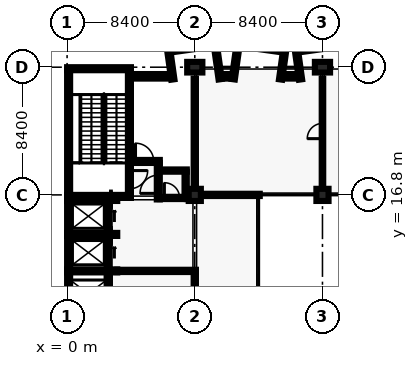
"""IFC4 building model, lengths in metres.
Left out: names, types, materials, properties, quantities, classifications, styles, units other than length and angle.
Written with IfcOpenShell. Run it as: python <this file> out.ifc"""

import sys

from ifc_helpers import new_model, si_unit, direction, frame, frame_2d, origin, origin_2d, place, context, subcontext, project, spatial, rectangle, extrude, element, fill, save


model = new_model("IFC4")
c1 = context("Model", 3, precision=1e-05, world=origin(), true_north=direction((0.0, 1.0)))
c2 = subcontext(c1, "Body", "Model", "MODEL_VIEW")
j1 = project(units=[si_unit("LENGTHUNIT", "METRE"), si_unit("PLANEANGLEUNIT", "RADIAN")], contexts=[c1])
p1 = place(None, origin())
s1 = spatial("IfcSite", under=j1, at=p1, CompositionType="ELEMENT")
p2 = place(p1, origin())
s2 = spatial("IfcBuilding", under=s1, at=p2, CompositionType="ELEMENT")
p3 = place(p2, frame((0.0, 0.0, 10.2)))
s3 = spatial("IfcBuildingStorey", under=s2, at=p3, CompositionType="ELEMENT", Elevation=10.2)
for number, where, z_axis, x_axis in (
    (1, (4.2, 16.7, 0.0), (0.0, 0.0, 1.0), (-1.0, 0.0, 0.0)),
    (2, (0.0, 25.1, 0.0), (0.0, 0.0, 1.0), (1.0, 0.0, 0.0)),
):
    element("IfcWall", number, at=place(p3, frame(where, z_axis=z_axis, x_axis=x_axis)), inside=s3, PredefinedType="SHEAR", context=c2, shape_type="SweptSolid", body=[
        extrude(rectangle(XDim=4.199, YDim=0.2, at=frame_2d((2.1, 0.0))), origin(), (0.0, 0.0, 1.0), 4.8),
    ])
p4 = place(p3, frame((0.1, 16.8, 0.0), z_axis=(0.0, 0.0, 1.0), x_axis=(0.0, 1.0, 0.0)))
e3 = element("IfcWall", 3, at=p4, inside=s3, PredefinedType="SHEAR", context=c2, shape_type="SweptSolid", body=[
    extrude(rectangle(XDim=8.2, YDim=0.2, at=frame_2d((4.1, 0.0))), origin(), (0.0, 0.0, 1.0), 4.8),
])
p5 = place(p3, frame((4.1, 25.0, 0.0), z_axis=(0.0, 0.0, 1.0), x_axis=(0.0, -1.0, 0.0)))
e4 = element("IfcWall", 4, at=p5, inside=s3, PredefinedType="SHEAR", context=c2, shape_type="SweptSolid", body=[
    extrude(rectangle(XDim=8.2, YDim=0.2, at=frame_2d((4.1, 0.0))), origin(), (0.0, 0.0, 1.0), 4.8),
])
p6 = place(p5, frame((6.6, 0.0, 0.0)))
e5 = element("IfcOpeningElement", 5, at=p6, cuts=e4, PredefinedType="OPENING", context=c2, shape_type="SweptSolid", body=[
    extrude(rectangle(XDim=1.2, YDim=2.1, at=frame_2d((0.6, 1.05))), frame((0.0, 0.11, 0.0), z_axis=(0.0, -1.0, 0.0), x_axis=(1.0, 0.0, 0.0)), (0.0, 0.0, 1.0), 0.22),
])
p7 = place(p3, frame((0.0, 11.8, 0.0), z_axis=(0.0, 0.0, 1.0), x_axis=(1.0, 0.0, 0.0)))
e6 = element("IfcWall", 6, at=p7, inside=s3, PredefinedType="SHEAR", context=c2, shape_type="SweptSolid", body=[
    extrude(rectangle(XDim=2.8, YDim=0.2, at=frame_2d((1.4, 0.0))), origin(), (0.0, 0.0, 1.0), 4.8),
])
p8 = place(p3, frame((0.1, 9.0, 0.0), z_axis=(0.0, 0.0, 1.0), x_axis=(0.0, 1.0, 0.0)))
e7 = element("IfcWall", 7, at=p8, inside=s3, PredefinedType="SHEAR", context=c2, shape_type="SweptSolid", body=[
    extrude(rectangle(XDim=2.7, YDim=0.2, at=frame_2d((1.35, 0.0))), origin(), (0.0, 0.0, 1.0), 4.8),
])
p9 = place(p3, frame((2.7, 11.7, 0.0), z_axis=(0.0, 0.0, 1.0), x_axis=(0.0, -1.0, 0.0)))
e8 = element("IfcWall", 8, at=p9, inside=s3, PredefinedType="SHEAR", context=c2, shape_type="SweptSolid", body=[
    extrude(rectangle(XDim=2.7, YDim=0.2, at=frame_2d((1.35, 0.0))), origin(), (0.0, 0.0, 1.0), 4.8),
])
p10 = place(p9, frame((0.85, 0.0, 0.0)))
e9 = element("IfcOpeningElement", 9, at=p10, cuts=e8, PredefinedType="OPENING", context=c2, shape_type="SweptSolid", body=[
    extrude(rectangle(XDim=1.1, YDim=2.1, at=frame_2d((0.55, 1.05))), frame((0.0, 0.11, 0.0), z_axis=(0.0, -1.0, 0.0), x_axis=(1.0, 0.0, 0.0)), (0.0, 0.0, 1.0), 0.22),
])
p11 = place(p3, frame((0.0, 14.2, 0.0), z_axis=(0.0, 0.0, 1.0), x_axis=(1.0, 0.0, 0.0)))
e10 = element("IfcWall", 10, at=p11, inside=s3, PredefinedType="SHEAR", context=c2, shape_type="SweptSolid", body=[
    extrude(rectangle(XDim=2.8, YDim=0.2, at=frame_2d((1.4, 0.0))), origin(), (0.0, 0.0, 1.0), 4.8),
])
p12 = place(p3, frame((0.1, 11.9, 0.0), z_axis=(0.0, 0.0, 1.0), x_axis=(0.0, 1.0, 0.0)))
e11 = element("IfcWall", 11, at=p12, inside=s3, PredefinedType="SHEAR", context=c2, shape_type="SweptSolid", body=[
    extrude(rectangle(XDim=2.2, YDim=0.2, at=frame_2d((1.1, 0.0))), origin(), (0.0, 0.0, 1.0), 4.8),
])
p13 = place(p3, frame((2.7, 14.1, 0.0), z_axis=(0.0, 0.0, 1.0), x_axis=(0.0, -1.0, 0.0)))
e12 = element("IfcWall", 12, at=p13, inside=s3, PredefinedType="SHEAR", context=c2, shape_type="SweptSolid", body=[
    extrude(rectangle(XDim=2.2, YDim=0.2, at=frame_2d((1.1, 0.0))), origin(), (0.0, 0.0, 1.0), 4.8),
])
p14 = place(p13, frame((0.55, 0.0, 0.0)))
e13 = element("IfcOpeningElement", 13, at=p14, cuts=e12, PredefinedType="OPENING", context=c2, shape_type="SweptSolid", body=[
    extrude(rectangle(XDim=1.1, YDim=2.1, at=frame_2d((0.55, 1.05))), frame((0.0, 0.11, 0.0), z_axis=(0.0, -1.0, 0.0), x_axis=(1.0, 0.0, 0.0)), (0.0, 0.0, 1.0), 0.22),
])
p15 = place(p3, frame((0.0, 16.5, 0.0), z_axis=(0.0, 0.0, 1.0), x_axis=(1.0, 0.0, 0.0)))
e14 = element("IfcWall", 14, at=p15, inside=s3, PredefinedType="SHEAR", context=c2, shape_type="SweptSolid", body=[
    extrude(rectangle(XDim=2.8, YDim=0.2, at=frame_2d((1.4, 0.0))), origin(), (0.0, 0.0, 1.0), 4.8),
])
p16 = place(p3, frame((0.1, 14.3, 0.0), z_axis=(0.0, 0.0, 1.0), x_axis=(0.0, 1.0, 0.0)))
e15 = element("IfcWall", 15, at=p16, inside=s3, PredefinedType="SHEAR", context=c2, shape_type="SweptSolid", body=[
    extrude(rectangle(XDim=2.1, YDim=0.2, at=frame_2d((1.05, 0.0))), origin(), (0.0, 0.0, 1.0), 4.8),
])
p17 = place(p3, frame((2.7, 16.4, 0.0), z_axis=(0.0, 0.0, 1.0), x_axis=(0.0, -1.0, 0.0)))
e16 = element("IfcWall", 16, at=p17, inside=s3, PredefinedType="SHEAR", context=c2, shape_type="SweptSolid", body=[
    extrude(rectangle(XDim=2.1, YDim=0.2, at=frame_2d((1.05, 0.0))), origin(), (0.0, 0.0, 1.0), 4.8),
])
p18 = place(p17, frame((0.45, 0.0, 0.0)))
e17 = element("IfcOpeningElement", 17, at=p18, cuts=e16, PredefinedType="OPENING", context=c2, shape_type="SweptSolid", body=[
    extrude(rectangle(XDim=1.1, YDim=2.1, at=frame_2d((0.55, 1.05))), frame((0.0, 0.11, 0.0), z_axis=(0.0, -1.0, 0.0), x_axis=(1.0, 0.0, 0.0)), (0.0, 0.0, 1.0), 0.22),
])
p19 = place(p3, frame((8.4, 16.8, 0.0), z_axis=(0.0, 0.0, 1.0), x_axis=(1.0, 0.0, 0.0)))
e18 = element("IfcColumn", 18, at=p19, inside=s3, PredefinedType="COLUMN", context=c2, shape_type="SweptSolid", body=[
    extrude(rectangle(XDim=0.8, YDim=0.8, at=origin_2d()), origin(), (0.0, 0.0, 1.0), 4.8),
])
p20 = place(p3, frame((8.4, 25.2, 0.0), z_axis=(0.0, 0.0, 1.0), x_axis=(1.0, 0.0, 0.0)))
e19 = element("IfcColumn", 19, at=p20, inside=s3, PredefinedType="COLUMN", context=c2, shape_type="SweptSolid", body=[
    extrude(rectangle(XDim=1.0, YDim=0.7, at=origin_2d()), origin(), (0.0, 0.0, 1.0), 4.8),
])
p21 = place(p3, frame((16.8, 16.8, 0.0), z_axis=(0.0, 0.0, 1.0), x_axis=(1.0, 0.0, 0.0)))
e20 = element("IfcColumn", 20, at=p21, inside=s3, PredefinedType="COLUMN", context=c2, shape_type="SweptSolid", body=[
    extrude(rectangle(XDim=0.8, YDim=0.8, at=origin_2d()), origin(), (0.0, 0.0, 1.0), 4.8),
])
p22 = place(p3, frame((16.8, 25.2, 0.0), z_axis=(0.0, 0.0, 1.0), x_axis=(1.0, 0.0, 0.0)))
e21 = element("IfcColumn", 21, at=p22, inside=s3, PredefinedType="COLUMN", context=c2, shape_type="SweptSolid", body=[
    extrude(rectangle(XDim=1.0, YDim=0.7, at=origin_2d()), origin(), (0.0, 0.0, 1.0), 4.8),
])
for number, where, z_axis, x_axis in (
    (22, (2.8, 11.8, 0.0), (0.0, 0.0, 1.0), (1.0, 0.0, 0.0)),
    (23, (2.8, 14.2, 0.0), (0.0, 0.0, 1.0), (1.0, 0.0, 0.0)),
    (24, (2.8, 16.5, 0.0), (0.0, 0.0, 1.0), (1.0, 0.0, 0.0)),
):
    element("IfcWall", number, at=place(p3, frame(where, z_axis=z_axis, x_axis=x_axis)), inside=s3, PredefinedType="SHEAR", context=c2, shape_type="SweptSolid", body=[
        extrude(rectangle(XDim=0.5, YDim=0.2, at=frame_2d((0.25, 0.0))), origin(), (0.0, 0.0, 1.0), 4.8),
    ])
p23 = place(p3, frame((6.956, 24.391, 0.0), z_axis=(0.0, 0.0, 1.0), x_axis=(-0.139161311926, 0.990269725511, 0.0)))
e25 = element("IfcWall", 25, at=p23, inside=s3, PredefinedType="SOLIDWALL", context=c2, shape_type="SweptSolid", body=[
    extrude(rectangle(XDim=1.8, YDim=0.215, at=frame_2d((0.9, 0.0))), origin(), (0.0, 0.0, 1.0), 4.5),
])
for number, where, z_axis, x_axis in (
    (26, (10.069, 24.405, 0.0), (0.0, 0.0, 1.0), (-0.139, 0.99, 0.0)),
    (27, (10.931, 24.405, 0.0), (0.0, 0.0, 1.0), (0.139, 0.99, 0.0)),
):
    element("IfcWall", number, at=place(p3, frame(where, z_axis=z_axis, x_axis=x_axis)), inside=s3, PredefinedType="SOLIDWALL", context=c2, shape_type="SweptSolid", body=[
        extrude(rectangle(XDim=2.219, YDim=0.215, at=frame_2d((1.11, 0.0))), origin(), (0.0, 0.0, 1.0), 4.5),
    ])
for number, where, z_axis, x_axis in (
    (28, (14.044, 24.391, 0.0), (0.0, 0.0, 1.0), (0.139, 0.99, 0.0)),
    (29, (15.356, 24.391, 0.0), (0.0, 0.0, 1.0), (-0.139, 0.99, 0.0)),
):
    element("IfcWall", number, at=place(p3, frame(where, z_axis=z_axis, x_axis=x_axis)), inside=s3, PredefinedType="SOLIDWALL", context=c2, shape_type="SweptSolid", body=[
        extrude(rectangle(XDim=1.8, YDim=0.215, at=frame_2d((0.9, 0.0))), origin(), (0.0, 0.0, 1.0), 4.5),
    ])
p24 = place(p3, frame((4.2, 24.6, 0.0), z_axis=(0.0, 0.0, 1.0), x_axis=(1.0, 0.0, 0.0)))
e30 = element("IfcWall", 30, at=p24, inside=s3, PredefinedType="SOLIDWALL", context=c2, shape_type="SweptSolid", body=[
    extrude(rectangle(XDim=2.618, YDim=0.3, at=frame_2d((1.309, 0.0))), origin(), (0.0, 0.0, 1.0), 4.5),
])
p25 = place(p24, frame((0.859, 0.0, 0.9)))
e31 = element("IfcOpeningElement", 31, at=p25, cuts=e30, PredefinedType="OPENING", context=c2, shape_type="SweptSolid", body=[
    extrude(rectangle(XDim=1.2, YDim=1.5, at=frame_2d((0.6, 0.75))), frame((0.0, 0.16, 0.0), z_axis=(0.0, -1.0, 0.0), x_axis=(1.0, 0.0, 0.0)), (0.0, 0.0, 1.0), 0.32),
])
p26 = place(p3, frame((10.15, 24.6, 0.0), z_axis=(0.0, 0.0, 1.0), x_axis=(1.0, 0.0, 0.0)))
e32 = element("IfcWall", 32, at=p26, inside=s3, PredefinedType="SOLIDWALL", context=c2, shape_type="SweptSolid", body=[
    extrude(rectangle(XDim=0.699, YDim=0.3, at=frame_2d((0.35, 0.0))), origin(), (0.0, 0.0, 1.0), 4.5),
])
p27 = place(p3, frame((14.182, 24.6, 0.0), z_axis=(0.0, 0.0, 1.0), x_axis=(1.0, 0.0, 0.0)))
e33 = element("IfcWall", 33, at=p27, inside=s3, PredefinedType="SOLIDWALL", context=c2, shape_type="SweptSolid", body=[
    extrude(rectangle(XDim=1.036, YDim=0.3, at=frame_2d((0.518, 0.0))), origin(), (0.0, 0.0, 1.0), 4.5),
])
p28 = place(p3, frame((4.2, 19.0, 0.0), z_axis=(0.0, 0.0, 1.0), x_axis=(1.0, 0.0, 0.0)))
e34 = element("IfcWall", 34, at=p28, inside=s3, PredefinedType="SOLIDWALL", context=c2, shape_type="SweptSolid", body=[
    extrude(rectangle(XDim=1.9, YDim=0.2, at=frame_2d((0.95, 0.0))), origin(), (0.0, 0.0, 1.0), 4.5),
])
p29 = place(p28, frame((0.3, 0.0, 0.0)))
e35 = element("IfcOpeningElement", 35, at=p29, cuts=e34, PredefinedType="OPENING", context=c2, shape_type="SweptSolid", body=[
    extrude(rectangle(XDim=1.2, YDim=2.1, at=frame_2d((0.6, 1.05))), frame((0.0, 0.11, 0.0), z_axis=(0.0, -1.0, 0.0), x_axis=(1.0, 0.0, 0.0)), (0.0, 0.0, 1.0), 0.22),
])
p30 = place(p3, frame((6.0, 16.5, 0.0), z_axis=(0.0, 0.0, 1.0), x_axis=(0.0, 1.0, 0.0)))
e36 = element("IfcWall", 36, at=p30, inside=s3, PredefinedType="SOLIDWALL", context=c2, shape_type="SweptSolid", body=[
    extrude(rectangle(XDim=2.4, YDim=0.2, at=frame_2d((1.2, 0.0))), origin(), (0.0, 0.0, 1.0), 4.0),
])
p31 = place(p30, frame((0.4, 0.0, 0.0)))
e37 = element("IfcOpeningElement", 37, at=p31, cuts=e36, PredefinedType="OPENING", context=c2, shape_type="SweptSolid", body=[
    extrude(rectangle(XDim=1.2, YDim=2.1, at=frame_2d((0.6, 1.05))), frame((0.0, 0.11, 0.0), z_axis=(0.0, -1.0, 0.0), x_axis=(1.0, 0.0, 0.0)), (0.0, 0.0, 1.0), 0.22),
])
p32 = place(p3, frame((6.1, 16.6, 0.0), z_axis=(0.0, 0.0, 1.0), x_axis=(1.0, 0.0, 0.0)))
e38 = element("IfcWall", 38, at=p32, inside=s3, PredefinedType="PARTITIONING", context=c2, shape_type="SweptSolid", body=[
    extrude(rectangle(XDim=1.775, YDim=0.15, at=frame_2d((0.887, 0.0))), origin(), (0.0, 0.0, 1.0), 4.0),
])
p33 = place(p32, frame((0.3, 0.0, 0.0)))
e39 = element("IfcOpeningElement", 39, at=p33, cuts=e38, PredefinedType="OPENING", context=c2, shape_type="SweptSolid", body=[
    extrude(rectangle(XDim=1.0, YDim=2.1, at=frame_2d((0.5, 1.05))), frame((0.0, 0.085, 0.0), z_axis=(0.0, -1.0, 0.0), x_axis=(1.0, 0.0, 0.0)), (0.0, 0.0, 1.0), 0.17),
])
p34 = place(p3, frame((8.325, 16.8, 0.0), z_axis=(0.0, 0.0, 1.0), x_axis=(1.0, 0.0, 0.0)))
e40 = element("IfcWall", 40, at=p34, inside=s3, PredefinedType="PARTITIONING", context=c2, shape_type="SweptSolid", body=[
    extrude(rectangle(XDim=4.35, YDim=0.15, at=frame_2d((2.175, 0.0))), origin(), (0.0, 0.0, 1.0), 3.8),
])
p35 = place(p3, frame((3.3, 11.8, 0.0), z_axis=(0.0, 0.0, 1.0), x_axis=(1.0, 0.0, 0.0)))
e41 = element("IfcWall", 41, at=p35, inside=s3, PredefinedType="SOLIDWALL", context=c2, shape_type="SweptSolid", body=[
    extrude(rectangle(XDim=5.175, YDim=0.15, at=frame_2d((2.587, 0.0))), origin(), (0.0, 0.0, 1.0), 3.8),
])
p36 = place(p3, frame((7.875, 16.6, 0.0), z_axis=(0.0, 0.0, 1.0), x_axis=(1.0, 0.0, 0.0)))
e42 = element("IfcWall", 42, at=p36, inside=s3, PredefinedType="SOLIDWALL", context=c2, shape_type="SweptSolid", body=[
    extrude(rectangle(XDim=0.6, YDim=0.15, at=frame_2d((0.3, 0.0))), origin(), (0.0, 0.0, 1.0), 3.8),
])
p37 = place(p3, frame((6.1, 18.4, 0.0), z_axis=(0.0, 0.0, 1.0), x_axis=(1.0, 0.0, 0.0)))
e43 = element("IfcWall", 43, at=p37, inside=s3, PredefinedType="SOLIDWALL", context=c2, shape_type="SweptSolid", body=[
    extrude(rectangle(XDim=1.775, YDim=0.15, at=frame_2d((0.887, 0.0))), origin(), (0.0, 0.0, 1.0), 4.5),
])
p38 = place(p3, frame((8.4, 8.875, 0.0), z_axis=(0.0, 0.0, 1.0), x_axis=(0.0, 1.0, 0.0)))
e44 = element("IfcWall", 44, at=p38, inside=s3, PredefinedType="SOLIDWALL", context=c2, shape_type="SweptSolid", body=[
    extrude(rectangle(XDim=2.85, YDim=0.15, at=frame_2d((1.425, 0.0))), origin(), (0.0, 0.0, 1.0), 3.8),
])
p39 = place(p3, frame((7.8, 16.675, 0.0), z_axis=(0.0, 0.0, 1.0), x_axis=(0.0, 1.0, 0.0)))
e45 = element("IfcWall", 45, at=p39, inside=s3, PredefinedType="SOLIDWALL", context=c2, shape_type="SweptSolid", body=[
    extrude(rectangle(XDim=1.65, YDim=0.15, at=frame_2d((0.825, 0.0))), origin(), (0.0, 0.0, 1.0), 4.0),
])
p40 = place(p3, frame((8.4, 16.875, 0.0), z_axis=(0.0, 0.0, 1.0), x_axis=(0.0, 1.0, 0.0)))
e46 = element("IfcWall", 46, at=p40, inside=s3, PredefinedType="SOLIDWALL", context=c2, shape_type="SweptSolid", body=[
    extrude(rectangle(XDim=7.575, YDim=0.15, at=frame_2d((3.788, 0.0))), origin(), (0.0, 0.0, 1.0), 3.8),
])
p41 = place(p3, frame((16.8, 16.75, 0.0), z_axis=(0.0, 0.0, 1.0), x_axis=(0.0, 1.0, 0.0)))
e47 = element("IfcWall", 47, at=p41, inside=s3, PredefinedType="PARTITIONING", context=c2, shape_type="SweptSolid", body=[
    extrude(rectangle(XDim=7.7, YDim=0.1, at=frame_2d((3.85, 0.0))), origin(), (0.0, 0.0, 1.0), 3.8),
])
p42 = place(p41, frame((3.75, 0.0, 0.0)))
e48 = element("IfcOpeningElement", 48, at=p42, cuts=e47, PredefinedType="OPENING", context=c2, shape_type="SweptSolid", body=[
    extrude(rectangle(XDim=1.0, YDim=2.1, at=frame_2d((0.5, 1.05))), frame((0.0, 0.06, 0.0), z_axis=(0.0, -1.0, 0.0), x_axis=(1.0, 0.0, 0.0)), (0.0, 0.0, 1.0), 0.12),
])
p43 = place(p25, origin())
e49 = element("IfcWindow", 49, at=p43, inside=s3, PartitioningType="SINGLE_PANEL", PredefinedType="WINDOW", context=c2, shape_type="SweptSolid", body=[
    extrude(rectangle(XDim=1.2, YDim=1.5, at=frame_2d((0.6, 0.75))), frame((0.0, 0.03, 0.0), z_axis=(0.0, -1.0, 0.0), x_axis=(1.0, 0.0, 0.0)), (0.0, 0.0, 1.0), 0.06),
])
fill(e31, e49)
p44 = place(p10, origin())
e50 = element("IfcDoor", 50, at=p44, inside=s3, OperationType="SLIDING_TO_LEFT", PredefinedType="DOOR", context=c2, shape_type="SweptSolid", body=[
    extrude(rectangle(XDim=1.1, YDim=2.1, at=frame_2d((0.55, 1.05))), frame((0.0, 0.025, 0.0), z_axis=(0.0, -1.0, 0.0), x_axis=(1.0, 0.0, 0.0)), (0.0, 0.0, 1.0), 0.05),
])
fill(e9, e50)
p45 = place(p14, origin())
e51 = element("IfcDoor", 51, at=p45, inside=s3, OperationType="SLIDING_TO_LEFT", PredefinedType="DOOR", context=c2, shape_type="SweptSolid", body=[
    extrude(rectangle(XDim=1.1, YDim=2.1, at=frame_2d((0.55, 1.05))), frame((0.0, 0.025, 0.0), z_axis=(0.0, -1.0, 0.0), x_axis=(1.0, 0.0, 0.0)), (0.0, 0.0, 1.0), 0.05),
])
fill(e13, e51)
p46 = place(p18, origin())
e52 = element("IfcDoor", 52, at=p46, inside=s3, OperationType="SLIDING_TO_LEFT", PredefinedType="DOOR", context=c2, shape_type="SweptSolid", body=[
    extrude(rectangle(XDim=1.1, YDim=2.1, at=frame_2d((0.55, 1.05))), frame((0.0, 0.025, 0.0), z_axis=(0.0, -1.0, 0.0), x_axis=(1.0, 0.0, 0.0)), (0.0, 0.0, 1.0), 0.05),
])
fill(e17, e52)
p47 = place(p6, origin())
e53 = element("IfcDoor", 53, at=p47, inside=s3, OperationType="SINGLE_SWING_RIGHT", PredefinedType="DOOR", context=c2, shape_type="SweptSolid", body=[
    extrude(rectangle(XDim=1.2, YDim=2.1, at=frame_2d((0.6, 1.05))), frame((0.0, 0.025, 0.0), z_axis=(0.0, -1.0, 0.0), x_axis=(1.0, 0.0, 0.0)), (0.0, 0.0, 1.0), 0.05),
])
fill(e5, e53)
p48 = place(p29, origin())
e54 = element("IfcDoor", 54, at=p48, inside=s3, OperationType="SINGLE_SWING_LEFT", PredefinedType="DOOR", context=c2, shape_type="SweptSolid", body=[
    extrude(rectangle(XDim=1.2, YDim=2.1, at=frame_2d((0.6, 1.05))), frame((0.0, 0.025, 0.0), z_axis=(0.0, -1.0, 0.0), x_axis=(1.0, 0.0, 0.0)), (0.0, 0.0, 1.0), 0.05),
])
fill(e35, e54)
p49 = place(p31, origin())
e55 = element("IfcDoor", 55, at=p49, inside=s3, OperationType="SINGLE_SWING_RIGHT", PredefinedType="DOOR", context=c2, shape_type="SweptSolid", body=[
    extrude(rectangle(XDim=1.2, YDim=2.1, at=frame_2d((0.6, 1.05))), frame((0.0, 0.025, 0.0), z_axis=(0.0, -1.0, 0.0), x_axis=(1.0, 0.0, 0.0)), (0.0, 0.0, 1.0), 0.05),
])
fill(e37, e55)
p50 = place(p33, origin())
e56 = element("IfcDoor", 56, at=p50, inside=s3, OperationType="SINGLE_SWING_RIGHT", PredefinedType="DOOR", context=c2, shape_type="SweptSolid", body=[
    extrude(rectangle(XDim=1.0, YDim=2.1, at=frame_2d((0.5, 1.05))), frame((0.0, 0.025, 0.0), z_axis=(0.0, -1.0, 0.0), x_axis=(1.0, 0.0, 0.0)), (0.0, 0.0, 1.0), 0.05),
])
fill(e39, e56)
p51 = place(p42, origin())
e57 = element("IfcDoor", 57, at=p51, inside=s3, OperationType="SINGLE_SWING_RIGHT", PredefinedType="DOOR", context=c2, shape_type="SweptSolid", body=[
    extrude(rectangle(XDim=1.0, YDim=2.1, at=frame_2d((0.5, 1.05))), frame((0.0, 0.025, 0.0), z_axis=(0.0, -1.0, 0.0), x_axis=(1.0, 0.0, 0.0)), (0.0, 0.0, 1.0), 0.05),
])
fill(e48, e57)
save(model, sys.argv[1])
